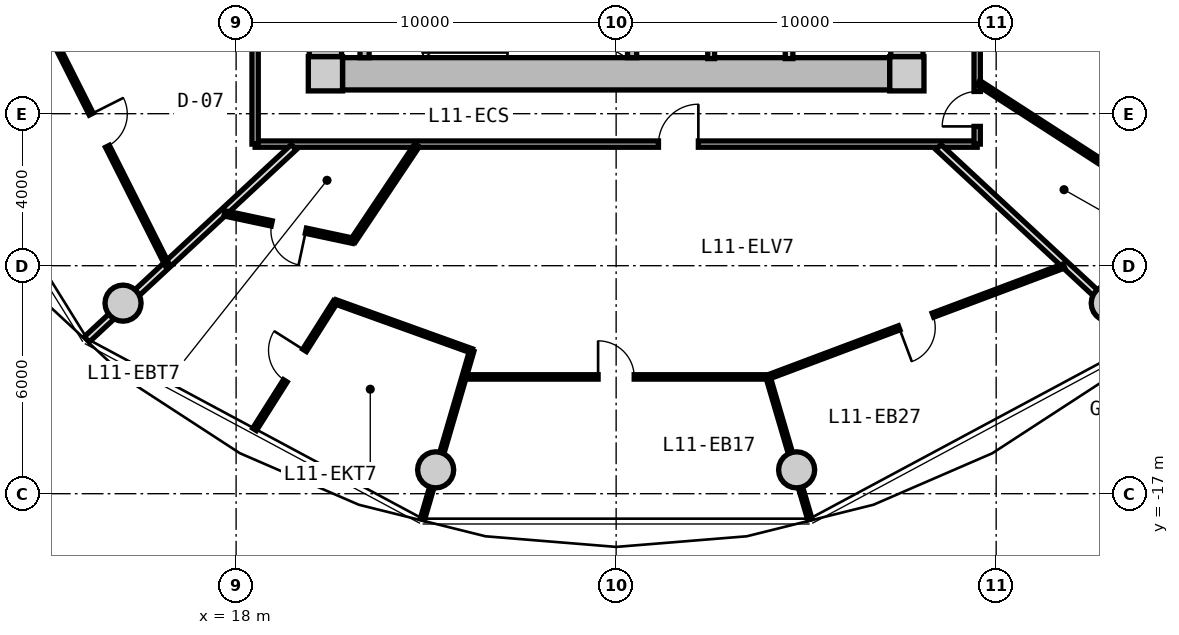
"""IFC4 building model, lengths in metres.
Left out: names, types, materials, properties, quantities, classifications, styles, units other than length and angle.
Written with IfcOpenShell. Run it as: python <this file> out.ifc"""

import sys

from ifc_helpers import new_model, si_unit, direction, frame, frame_2d, origin, origin_2d, place, context, subcontext, project, spatial, rectangle, circle, extrude, source, transform, mapped, element, fill, save


model = new_model("IFC4")
c1 = context("Model", 3, precision=1e-05, world=origin(), true_north=direction((0.0, 1.0)))
c2 = subcontext(c1, "Body", "Model", "MODEL_VIEW")
j1 = project(units=[si_unit("LENGTHUNIT", "METRE"), si_unit("PLANEANGLEUNIT", "RADIAN")], contexts=[c1])
p1 = place(None, origin())
s1 = spatial("IfcSite", under=j1, at=p1, CompositionType="ELEMENT")
p2 = place(p1, origin())
s2 = spatial("IfcBuilding", under=s1, at=p2, CompositionType="ELEMENT")
p3 = place(p2, frame((0.0, 0.0, 39.9)))
s3 = spatial("IfcBuildingStorey", under=s2, at=p3, CompositionType="ELEMENT", Elevation=39.9)
m1 = source(origin(), c2, "Body", "SweptSolid", [
    extrude(rectangle(XDim=0.9, YDim=0.9, at=origin_2d()), origin(), (0.0, 0.0, 1.0), 3.05),
])
for number, where, z_axis, x_axis in (
    (1, (20.35, -5.95, 0.0), (0.0, 0.0, 1.0), (1.0, 0.0, 0.0)),
    (2, (35.65, -5.95, 0.0), (0.0, 0.0, 1.0), (1.0, 0.0, 0.0)),
):
    element("IfcColumn", number, at=place(p3, frame(where, z_axis=z_axis, x_axis=x_axis)), inside=s3, PredefinedType="COLUMN", context=c2, shape_type="MappedRepresentation", body=[
        mapped(m1, transform((0.0, 0.0, 0.0), x_axis=(1.0, 0.0, 0.0), y_axis=(0.0, 1.0, 0.0), z_axis=(0.0, 0.0, 1.0), scale=1.0)),
    ])
m2 = source(origin(), c2, "Body", "SweptSolid", [
    extrude(rectangle(XDim=14.4, YDim=0.85, at=frame_2d((7.2, 0.0))), origin(), (0.0, 0.0, 1.0), 2.79),
])
p4 = place(p3, frame((35.2, -5.95, 0.0), z_axis=(0.0, 0.0, 1.0), x_axis=(-1.0, 0.0, 0.0)))
e3 = element("IfcWall", 3, at=p4, inside=s3, PredefinedType="SHEAR", context=c2, shape_type="MappedRepresentation", body=[
    mapped(m2, transform((0.0, 0.0, 0.0), x_axis=(1.0, 0.0, 0.0), y_axis=(0.0, 1.0, 0.0), z_axis=(0.0, 0.0, 1.0), scale=1.0)),
])
m3 = source(origin(), c2, "Body", "SweptSolid", [
    extrude(rectangle(XDim=11.0, YDim=0.85, at=frame_2d((5.5, 0.0))), origin(), (0.0, 0.0, 1.0), 2.79),
])
p5 = place(p3, frame((20.35, -5.5, 0.0), z_axis=(0.0, 0.0, 1.0), x_axis=(0.0, 1.0, 0.0)))
e4 = element("IfcWall", 4, at=p5, inside=s3, PredefinedType="SHEAR", context=c2, shape_type="MappedRepresentation", body=[
    mapped(m3, transform((0.0, 0.0, 0.0), x_axis=(1.0, 0.0, 0.0), y_axis=(0.0, 1.0, 0.0), z_axis=(0.0, 0.0, 1.0), scale=1.0)),
])
p6 = place(p5, frame((3.8, 0.0, 0.0)))
e5 = element("IfcOpeningElement", 5, at=p6, cuts=e4, PredefinedType="OPENING", context=c2, shape_type="SweptSolid", body=[
    extrude(rectangle(XDim=1.2, YDim=2.15, at=frame_2d((0.6, 1.075))), frame((0.0, 0.435, 0.0), z_axis=(0.0, -1.0, 0.0), x_axis=(1.0, 0.0, 0.0)), (0.0, 0.0, 1.0), 0.87),
])
p7 = place(p3, frame((35.65, 5.5, 0.0), z_axis=(0.0, 0.0, 1.0), x_axis=(0.0, -1.0, 0.0)))
e6 = element("IfcWall", 6, at=p7, inside=s3, PredefinedType="SHEAR", context=c2, shape_type="MappedRepresentation", body=[
    mapped(m3, transform((0.0, 0.0, 0.0), x_axis=(1.0, 0.0, 0.0), y_axis=(0.0, 1.0, 0.0), z_axis=(0.0, 0.0, 1.0), scale=1.0)),
])
p8 = place(p7, frame((5.65, 0.0, 0.0)))
e7 = element("IfcOpeningElement", 7, at=p8, cuts=e6, PredefinedType="OPENING", context=c2, shape_type="SweptSolid", body=[
    extrude(rectangle(XDim=1.2, YDim=2.15, at=frame_2d((0.6, 1.075))), frame((0.0, 0.435, 0.0), z_axis=(0.0, -1.0, 0.0), x_axis=(1.0, 0.0, 0.0)), (0.0, 0.0, 1.0), 0.87),
])
p9 = place(p7, frame((9.3, 0.0, 0.0)))
e8 = element("IfcOpeningElement", 8, at=p9, cuts=e6, PredefinedType="OPENING", context=c2, shape_type="SweptSolid", body=[
    extrude(rectangle(XDim=1.0, YDim=2.1, at=frame_2d((0.5, 1.05))), frame((0.0, 0.435, 0.0), z_axis=(0.0, -1.0, 0.0), x_axis=(1.0, 0.0, 0.0)), (0.0, 0.0, 1.0), 0.87),
])
m4 = source(origin(), c2, "Body", "SweptSolid", [
    extrude(circle(Radius=0.475, at=origin_2d()), origin(), (0.0, 0.0, 1.0), 3.05),
])
for number, where, z_axis, x_axis in (
    (9, (15.025, -11.985, 0.0), (0.0, 0.0, 1.0), (1.0, 0.0, 0.0)),
    (10, (23.251, -16.373, 0.0), (0.0, 0.0, 1.0), (1.0, 0.0, 0.0)),
    (11, (32.749, -16.373, 0.0), (0.0, 0.0, 1.0), (1.0, 0.0, 0.0)),
    (12, (40.975, -11.985, 0.0), (0.0, 0.0, 1.0), (1.0, 0.0, 0.0)),
):
    element("IfcColumn", number, at=place(p3, frame(where, z_axis=z_axis, x_axis=x_axis)), inside=s3, PredefinedType="COLUMN", context=c2, shape_type="MappedRepresentation", body=[
        mapped(m4, transform((0.0, 0.0, 0.0), x_axis=(1.0, 0.0, 0.0), y_axis=(0.0, 1.0, 0.0), z_axis=(0.0, 0.0, 1.0), scale=1.0)),
    ])
m5 = source(origin(), c2, "Body", "SweptSolid", [
    extrude(rectangle(XDim=3.075, YDim=0.24, at=frame_2d((1.538, 0.0))), origin(), (0.0, 0.0, 1.0), 2.79),
])
for number, where, z_axis, x_axis in (
    (13, (21.38, -5.525, 0.0), (0.0, 0.0, 1.0), (0.0, 1.0, 0.0)),
    (14, (28.42, -5.525, 0.0), (0.0, 0.0, 1.0), (0.0, 1.0, 0.0)),
):
    element("IfcWall", number, at=place(p3, frame(where, z_axis=z_axis, x_axis=x_axis)), inside=s3, PredefinedType="PARTITIONING", context=c2, shape_type="MappedRepresentation", body=[
        mapped(m5, transform((0.0, 0.0, 0.0), x_axis=(1.0, 0.0, 0.0), y_axis=(0.0, 1.0, 0.0), z_axis=(0.0, 0.0, 1.0), scale=1.0)),
    ])
m6 = source(origin(), c2, "Body", "SweptSolid", [
    extrude(rectangle(XDim=3.8, YDim=0.2, at=frame_2d((1.9, 0.0))), origin(), (0.0, 0.0, 1.0), 2.775),
])
p10 = place(p3, frame((32.55, -5.55, 0.0), z_axis=(0.0, 0.0, 1.0), x_axis=(0.0, 1.0, 0.0)))
e15 = element("IfcWall", 15, at=p10, inside=s3, PredefinedType="PARTITIONING", context=c2, shape_type="MappedRepresentation", body=[
    mapped(m6, transform((0.0, 0.0, 0.0), x_axis=(1.0, 0.0, 0.0), y_axis=(0.0, 1.0, 0.0), z_axis=(0.0, 0.0, 1.0), scale=1.0)),
])
m7 = source(origin(), c2, "Body", "SweptSolid", [
    extrude(rectangle(XDim=3.22, YDim=0.18, at=frame_2d((1.61, 0.0))), origin(), (0.0, 0.0, 1.0), 2.775),
])
p11 = place(p3, frame((30.5, -5.55, 0.0), z_axis=(0.0, 0.0, 1.0), x_axis=(0.0, 1.0, 0.0)))
e16 = element("IfcWall", 16, at=p11, inside=s3, PredefinedType="PARTITIONING", context=c2, shape_type="MappedRepresentation", body=[
    mapped(m7, transform((0.0, 0.0, 0.0), x_axis=(1.0, 0.0, 0.0), y_axis=(0.0, 1.0, 0.0), z_axis=(0.0, 0.0, 1.0), scale=1.0)),
])
m8 = source(origin(), c2, "Body", "SweptSolid", [
    extrude(rectangle(XDim=19.0, YDim=0.165, at=frame_2d((9.5, 0.0))), origin(), (0.0, 0.0, 1.0), 2.775),
])
p12 = place(p3, frame((37.5, -7.8, 0.0), z_axis=(0.0, 0.0, 1.0), x_axis=(-1.0, 0.0, 0.0)))
e17 = element("IfcWall", 17, at=p12, inside=s3, PredefinedType="PARTITIONING", context=c2, shape_type="MappedRepresentation", body=[
    mapped(m8, transform((0.0, 0.0, 0.0), x_axis=(1.0, 0.0, 0.0), y_axis=(0.0, 1.0, 0.0), z_axis=(0.0, 0.0, 1.0), scale=1.0)),
])
p13 = place(p12, frame((7.336, 0.0, 0.0)))
e18 = element("IfcOpeningElement", 18, at=p13, cuts=e17, PredefinedType="OPENING", context=c2, shape_type="SweptSolid", body=[
    extrude(rectangle(XDim=1.05, YDim=2.15, at=frame_2d((0.525, 1.075))), frame((0.0, 0.093, 0.0), z_axis=(0.0, -1.0, 0.0), x_axis=(1.0, 0.0, 0.0)), (0.0, 0.0, 1.0), 0.185),
])
m9 = source(origin(), c2, "Body", "SweptSolid", [
    extrude(rectangle(XDim=15.6, YDim=0.165, at=frame_2d((7.8, 0.0))), origin(), (0.0, 0.0, 1.0), 2.775),
])
p14 = place(p3, frame((18.5, -7.8, 0.0), z_axis=(0.0, 0.0, 1.0), x_axis=(0.0, 1.0, 0.0)))
e19 = element("IfcWall", 19, at=p14, inside=s3, PredefinedType="PARTITIONING", context=c2, shape_type="MappedRepresentation", body=[
    mapped(m9, transform((0.0, 0.0, 0.0), x_axis=(1.0, 0.0, 0.0), y_axis=(0.0, 1.0, 0.0), z_axis=(0.0, 0.0, 1.0), scale=1.0)),
])
p15 = place(p14, frame((7.275, 0.0, 0.0)))
e20 = element("IfcOpeningElement", 20, at=p15, cuts=e19, PredefinedType="OPENING", context=c2, shape_type="SweptSolid", body=[
    extrude(rectangle(XDim=1.05, YDim=2.15, at=frame_2d((0.525, 1.075))), frame((0.0, 0.093, 0.0), z_axis=(0.0, -1.0, 0.0), x_axis=(1.0, 0.0, 0.0)), (0.0, 0.0, 1.0), 0.185),
])
p16 = place(p3, frame((37.5, 7.8, 0.0), z_axis=(0.0, 0.0, 1.0), x_axis=(0.0, -1.0, 0.0)))
e21 = element("IfcWall", 21, at=p16, inside=s3, PredefinedType="PARTITIONING", context=c2, shape_type="MappedRepresentation", body=[
    mapped(m9, transform((0.0, 0.0, 0.0), x_axis=(1.0, 0.0, 0.0), y_axis=(0.0, 1.0, 0.0), z_axis=(0.0, 0.0, 1.0), scale=1.0)),
])
p17 = place(p16, frame((14.215, 0.0, 0.0)))
e22 = element("IfcOpeningElement", 22, at=p17, cuts=e21, PredefinedType="OPENING", context=c2, shape_type="SweptSolid", body=[
    extrude(rectangle(XDim=0.92, YDim=2.1, at=frame_2d((0.46, 1.05))), frame((0.0, 0.093, 0.0), z_axis=(0.0, -1.0, 0.0), x_axis=(1.0, 0.0, 0.0)), (0.0, 0.0, 1.0), 0.185),
])
p18 = place(p16, frame((11.609, 0.0, 0.0)))
e23 = element("IfcOpeningElement", 23, at=p18, cuts=e21, PredefinedType="OPENING", context=c2, shape_type="SweptSolid", body=[
    extrude(rectangle(XDim=0.92, YDim=2.1, at=frame_2d((0.46, 1.05))), frame((0.0, 0.093, 0.0), z_axis=(0.0, -1.0, 0.0), x_axis=(1.0, 0.0, 0.0)), (0.0, 0.0, 1.0), 0.185),
])
p19 = place(p16, frame((7.175, 0.0, 0.0)))
e24 = element("IfcOpeningElement", 24, at=p19, cuts=e21, PredefinedType="OPENING", context=c2, shape_type="SweptSolid", body=[
    extrude(rectangle(XDim=1.25, YDim=2.2, at=frame_2d((0.625, 1.1))), frame((0.0, 0.093, 0.0), z_axis=(0.0, -1.0, 0.0), x_axis=(1.0, 0.0, 0.0)), (0.0, 0.0, 1.0), 0.185),
])
m10 = source(origin(), c2, "Body", "SweptSolid", [
    extrude(rectangle(XDim=7.435, YDim=0.19, at=frame_2d((3.717, 0.0))), origin(), (0.0, 0.0, 1.0), 2.225),
])
p20 = place(p3, frame((19.517, -7.88, 0.0), z_axis=(0.0, 0.0, 1.0), x_axis=(-0.732651956848, -0.680603489652, 0.0)))
e25 = element("IfcWall", 25, at=p20, inside=s3, PredefinedType="PARTITIONING", context=c2, shape_type="MappedRepresentation", body=[
    mapped(m10, transform((0.0, 0.0, 0.0), x_axis=(1.0, 0.0, 0.0), y_axis=(0.0, 1.0, 0.0), z_axis=(0.0, 0.0, 1.0), scale=1.0)),
])
m11 = source(origin(), c2, "Body", "SweptSolid", [
    extrude(rectangle(XDim=8.018, YDim=0.115, at=frame_2d((4.009, 0.0))), origin(), (0.0, 0.0, 1.0), 2.775),
])
p21 = place(p3, frame((12.596, -3.854, 0.0), z_axis=(0.0, 0.0, 1.0), x_axis=(0.450134355233, -0.89296084026, 0.0)))
e26 = element("IfcWall", 26, at=p21, inside=s3, PredefinedType="PARTITIONING", context=c2, shape_type="MappedRepresentation", body=[
    mapped(m11, transform((0.0, 0.0, 0.0), x_axis=(1.0, 0.0, 0.0), y_axis=(0.0, 1.0, 0.0), z_axis=(0.0, 0.0, 1.0), scale=1.0)),
])
p22 = place(p21, frame((3.534, 0.0, 0.0)))
e27 = element("IfcOpeningElement", 27, at=p22, cuts=e26, PredefinedType="OPENING", context=c2, shape_type="SweptSolid", body=[
    extrude(rectangle(XDim=0.95, YDim=2.1, at=frame_2d((0.475, 1.05))), frame((0.0, 0.067, 0.0), z_axis=(0.0, -1.0, 0.0), x_axis=(1.0, 0.0, 0.0)), (0.0, 0.0, 1.0), 0.135),
])
p23 = place(p3, frame((36.483, -7.88, 0.0), z_axis=(0.0, 0.0, 1.0), x_axis=(0.732651956848, -0.680603489652, 0.0)))
e28 = element("IfcWall", 28, at=p23, inside=s3, PredefinedType="PARTITIONING", context=c2, shape_type="MappedRepresentation", body=[
    mapped(m10, transform((0.0, 0.0, 0.0), x_axis=(1.0, 0.0, 0.0), y_axis=(0.0, 1.0, 0.0), z_axis=(0.0, 0.0, 1.0), scale=1.0)),
])
m12 = source(origin(), c2, "Body", "SweptSolid", [
    extrude(rectangle(XDim=7.993, YDim=0.115, at=frame_2d((3.996, 0.0))), origin(), (0.0, 0.0, 1.0), 2.775),
])
p24 = place(p3, frame((24.004, -13.927, 0.0), z_axis=(0.0, 0.0, 1.0), x_axis=(1.0, 0.0, 0.0)))
e29 = element("IfcWall", 29, at=p24, inside=s3, PredefinedType="PARTITIONING", context=c2, shape_type="MappedRepresentation", body=[
    mapped(m12, transform((0.0, 0.0, 0.0), x_axis=(1.0, 0.0, 0.0), y_axis=(0.0, 1.0, 0.0), z_axis=(0.0, 0.0, 1.0), scale=1.0)),
])
p25 = place(p24, frame((3.521, 0.0, 0.0)))
e30 = element("IfcOpeningElement", 30, at=p25, cuts=e29, PredefinedType="OPENING", context=c2, shape_type="SweptSolid", body=[
    extrude(rectangle(XDim=0.95, YDim=2.1, at=frame_2d((0.475, 1.05))), frame((0.0, 0.067, 0.0), z_axis=(0.0, -1.0, 0.0), x_axis=(1.0, 0.0, 0.0)), (0.0, 0.0, 1.0), 0.135),
])
m13 = source(origin(), c2, "Body", "SweptSolid", [
    extrude(rectangle(XDim=4.625, YDim=0.115, at=frame_2d((2.312, 0.0))), origin(), (0.0, 0.0, 1.0), 2.225),
])
p26 = place(p3, frame((24.201, -13.239, 0.0), z_axis=(0.0, 0.0, 1.0), x_axis=(-0.2810742844, -0.959686014616, 0.0)))
e31 = element("IfcWall", 31, at=p26, inside=s3, PredefinedType="PARTITIONING", context=c2, shape_type="MappedRepresentation", body=[
    mapped(m13, transform((0.0, 0.0, 0.0), x_axis=(1.0, 0.0, 0.0), y_axis=(0.0, 1.0, 0.0), z_axis=(0.0, 0.0, 1.0), scale=1.0)),
])
m14 = source(origin(), c2, "Body", "SweptSolid", [
    extrude(rectangle(XDim=8.32, YDim=0.115, at=frame_2d((4.16, 0.0))), origin(), (0.0, 0.0, 1.0), 2.775),
])
p27 = place(p3, frame((31.997, -13.93, 0.0), z_axis=(0.0, 0.0, 1.0), x_axis=(0.936180763098, 0.351518959382, 0.0)))
e32 = element("IfcWall", 32, at=p27, inside=s3, PredefinedType="PARTITIONING", context=c2, shape_type="MappedRepresentation", body=[
    mapped(m14, transform((0.0, 0.0, 0.0), x_axis=(1.0, 0.0, 0.0), y_axis=(0.0, 1.0, 0.0), z_axis=(0.0, 0.0, 1.0), scale=1.0)),
])
p28 = place(p27, frame((3.685, 0.0, 0.0)))
e33 = element("IfcOpeningElement", 33, at=p28, cuts=e32, PredefinedType="OPENING", context=c2, shape_type="SweptSolid", body=[
    extrude(rectangle(XDim=0.95, YDim=2.1, at=frame_2d((0.475, 1.05))), frame((0.0, 0.067, 0.0), z_axis=(0.0, -1.0, 0.0), x_axis=(1.0, 0.0, 0.0)), (0.0, 0.0, 1.0), 0.135),
])
m15 = source(origin(), c2, "Body", "SweptSolid", [
    extrude(rectangle(XDim=3.905, YDim=0.115, at=frame_2d((1.952, 0.0))), origin(), (0.0, 0.0, 1.0), 2.225),
])
p29 = place(p3, frame((31.997, -13.93, 0.0), z_axis=(0.0, 0.0, 1.0), x_axis=(0.282037692958, -0.959403324859, 0.0)))
e34 = element("IfcWall", 34, at=p29, inside=s3, PredefinedType="PARTITIONING", context=c2, shape_type="MappedRepresentation", body=[
    mapped(m15, transform((0.0, 0.0, 0.0), x_axis=(1.0, 0.0, 0.0), y_axis=(0.0, 1.0, 0.0), z_axis=(0.0, 0.0, 1.0), scale=1.0)),
])
m16 = source(origin(), c2, "Body", "SweptSolid", [
    extrude(rectangle(XDim=3.025, YDim=0.14, at=frame_2d((1.513, 0.0))), origin(), (0.0, 0.0, 1.0), 2.775),
])
p30 = place(p3, frame((22.76, -7.83, 0.0), z_axis=(0.0, 0.0, 1.0), x_axis=(-0.556189165904, -0.831055721195, 0.0)))
e35 = element("IfcWall", 35, at=p30, inside=s3, PredefinedType="PARTITIONING", context=c2, shape_type="MappedRepresentation", body=[
    mapped(m16, transform((0.0, 0.0, 0.0), x_axis=(1.0, 0.0, 0.0), y_axis=(0.0, 1.0, 0.0), z_axis=(0.0, 0.0, 1.0), scale=1.0)),
])
m17 = source(origin(), c2, "Body", "SweptSolid", [
    extrude(rectangle(XDim=3.459, YDim=0.14, at=frame_2d((1.729, 0.0))), origin(), (0.0, 0.0, 1.0), 2.775),
])
p31 = place(p3, frame((21.078, -10.344, 0.0), z_axis=(0.0, 0.0, 1.0), x_axis=(-0.978006468578, 0.208574560815, 0.0)))
e36 = element("IfcWall", 36, at=p31, inside=s3, PredefinedType="PARTITIONING", context=c2, shape_type="MappedRepresentation", body=[
    mapped(m17, transform((0.0, 0.0, 0.0), x_axis=(1.0, 0.0, 0.0), y_axis=(0.0, 1.0, 0.0), z_axis=(0.0, 0.0, 1.0), scale=1.0)),
])
p32 = place(p31, frame((1.27, 0.0, 0.0)))
e37 = element("IfcOpeningElement", 37, at=p32, cuts=e36, PredefinedType="OPENING", context=c2, shape_type="SweptSolid", body=[
    extrude(rectangle(XDim=0.92, YDim=2.1, at=frame_2d((0.46, 1.05))), frame((0.0, 0.08, 0.0), z_axis=(0.0, -1.0, 0.0), x_axis=(1.0, 0.0, 0.0)), (0.0, 0.0, 1.0), 0.16),
])
m18 = source(origin(), c2, "Body", "SweptSolid", [
    extrude(rectangle(XDim=3.974, YDim=0.115, at=frame_2d((1.987, 0.0))), origin(), (0.0, 0.0, 1.0), 2.775),
])
p33 = place(p3, frame((20.611, -11.95, 0.0), z_axis=(0.0, 0.0, 1.0), x_axis=(-0.534810918023, -0.844971764003, 0.0)))
e38 = element("IfcWall", 38, at=p33, inside=s3, PredefinedType="PARTITIONING", context=c2, shape_type="MappedRepresentation", body=[
    mapped(m18, transform((0.0, 0.0, 0.0), x_axis=(1.0, 0.0, 0.0), y_axis=(0.0, 1.0, 0.0), z_axis=(0.0, 0.0, 1.0), scale=1.0)),
])
p34 = place(p33, frame((1.512, 0.0, 0.0)))
e39 = element("IfcOpeningElement", 39, at=p34, cuts=e38, PredefinedType="OPENING", context=c2, shape_type="SweptSolid", body=[
    extrude(rectangle(XDim=0.95, YDim=2.1, at=frame_2d((0.475, 1.05))), frame((0.0, 0.067, 0.0), z_axis=(0.0, -1.0, 0.0), x_axis=(1.0, 0.0, 0.0)), (0.0, 0.0, 1.0), 0.135),
])
m19 = source(origin(), c2, "Body", "SweptSolid", [
    extrude(rectangle(XDim=3.814, YDim=0.115, at=frame_2d((1.907, 0.0))), origin(), (0.0, 0.0, 1.0), 2.775),
])
p35 = place(p3, frame((20.611, -11.95, 0.0), z_axis=(0.0, 0.0, 1.0), x_axis=(0.940935542004, -0.338585743637, 0.0)))
e40 = element("IfcWall", 40, at=p35, inside=s3, PredefinedType="PARTITIONING", context=c2, shape_type="MappedRepresentation", body=[
    mapped(m19, transform((0.0, 0.0, 0.0), x_axis=(1.0, 0.0, 0.0), y_axis=(0.0, 1.0, 0.0), z_axis=(0.0, 0.0, 1.0), scale=1.0)),
])
m20 = source(origin(), c2, "Body", "SweptSolid", [
    extrude(rectangle(XDim=7.304, YDim=0.14, at=frame_2d((3.652, 0.0))), origin(), (0.0, 0.0, 1.0), 2.775),
])
p36 = place(p3, frame((37.53, -6.185, 0.0), z_axis=(0.0, 0.0, 1.0), x_axis=(0.83973870965, -0.54299069929, 0.0)))
e41 = element("IfcWall", 41, at=p36, inside=s3, PredefinedType="PARTITIONING", context=c2, shape_type="MappedRepresentation", body=[
    mapped(m20, transform((0.0, 0.0, 0.0), x_axis=(1.0, 0.0, 0.0), y_axis=(0.0, 1.0, 0.0), z_axis=(0.0, 0.0, 1.0), scale=1.0)),
])
m21 = source(origin(), c2, "Body", "SweptSolid", [
    extrude(rectangle(XDim=0.95, YDim=2.1, at=frame_2d((0.475, 1.05))), frame((0.0, 0.025, 0.0), z_axis=(0.0, -1.0, 0.0), x_axis=(1.0, 0.0, 0.0)), (0.0, 0.0, 1.0), 0.05),
])
p37 = place(p22, origin())
e42 = element("IfcDoor", 42, at=p37, inside=s3, OperationType="SINGLE_SWING_LEFT", PredefinedType="DOOR", context=c2, shape_type="MappedRepresentation", body=[
    mapped(m21, transform((0.0, 0.0, 0.0), x_axis=(1.0, 0.0, 0.0), y_axis=(0.0, 1.0, 0.0), z_axis=(0.0, 0.0, 1.0), scale=1.0)),
])
fill(e27, e42)
m22 = source(origin(), c2, "Body", "SweptSolid", [
    extrude(rectangle(XDim=1.05, YDim=2.15, at=frame_2d((0.525, 1.075))), frame((0.0, 0.025, 0.0), z_axis=(0.0, -1.0, 0.0), x_axis=(1.0, 0.0, 0.0)), (0.0, 0.0, 1.0), 0.05),
])
p38 = place(p13, frame((1.05, 0.0, 0.0), z_axis=(0.0, 0.0, 1.0), x_axis=(-1.0, 0.0, 0.0)))
e43 = element("IfcDoor", 43, at=p38, inside=s3, OperationType="SINGLE_SWING_RIGHT", PredefinedType="DOOR", context=c2, shape_type="MappedRepresentation", body=[
    mapped(m22, transform((0.0, 0.0, 0.0), x_axis=(1.0, 0.0, 0.0), y_axis=(0.0, 1.0, 0.0), z_axis=(0.0, 0.0, 1.0), scale=1.0)),
])
fill(e18, e43)
m23 = source(origin(), c2, "Body", "SweptSolid", [
    extrude(rectangle(XDim=0.92, YDim=2.1, at=frame_2d((0.46, 1.05))), frame((0.0, 0.025, 0.0), z_axis=(0.0, -1.0, 0.0), x_axis=(1.0, 0.0, 0.0)), (0.0, 0.0, 1.0), 0.05),
])
p39 = place(p32, origin())
e44 = element("IfcDoor", 44, at=p39, inside=s3, OperationType="SINGLE_SWING_LEFT", PredefinedType="DOOR", context=c2, shape_type="MappedRepresentation", body=[
    mapped(m23, transform((0.0, 0.0, 0.0), x_axis=(1.0, 0.0, 0.0), y_axis=(0.0, 1.0, 0.0), z_axis=(0.0, 0.0, 1.0), scale=1.0)),
])
fill(e37, e44)
p40 = place(p34, frame((0.95, 0.0, 0.0), z_axis=(0.0, 0.0, 1.0), x_axis=(-1.0, 0.0, 0.0)))
e45 = element("IfcDoor", 45, at=p40, inside=s3, OperationType="SINGLE_SWING_RIGHT", PredefinedType="DOOR", context=c2, shape_type="MappedRepresentation", body=[
    mapped(m21, transform((0.0, 0.0, 0.0), x_axis=(1.0, 0.0, 0.0), y_axis=(0.0, 1.0, 0.0), z_axis=(0.0, 0.0, 1.0), scale=1.0)),
])
fill(e39, e45)
p41 = place(p25, origin())
e46 = element("IfcDoor", 46, at=p41, inside=s3, OperationType="SINGLE_SWING_LEFT", PredefinedType="DOOR", context=c2, shape_type="MappedRepresentation", body=[
    mapped(m21, transform((0.0, 0.0, 0.0), x_axis=(1.0, 0.0, 0.0), y_axis=(0.0, 1.0, 0.0), z_axis=(0.0, 0.0, 1.0), scale=1.0)),
])
fill(e30, e46)
p42 = place(p28, frame((0.95, 0.0, 0.0), z_axis=(0.0, 0.0, 1.0), x_axis=(-1.0, 0.0, 0.0)))
e47 = element("IfcDoor", 47, at=p42, inside=s3, OperationType="SINGLE_SWING_RIGHT", PredefinedType="DOOR", context=c2, shape_type="MappedRepresentation", body=[
    mapped(m21, transform((0.0, 0.0, 0.0), x_axis=(1.0, 0.0, 0.0), y_axis=(0.0, 1.0, 0.0), z_axis=(0.0, 0.0, 1.0), scale=1.0)),
])
fill(e33, e47)
p43 = place(p17, frame((0.92, 0.0, 0.0), z_axis=(0.0, 0.0, 1.0), x_axis=(-1.0, 0.0, 0.0)))
e48 = element("IfcDoor", 48, at=p43, inside=s3, OperationType="SINGLE_SWING_LEFT", PredefinedType="DOOR", context=c2, shape_type="MappedRepresentation", body=[
    mapped(m23, transform((0.0, 0.0, 0.0), x_axis=(1.0, 0.0, 0.0), y_axis=(0.0, 1.0, 0.0), z_axis=(0.0, 0.0, 1.0), scale=1.0)),
])
fill(e22, e48)
save(model, sys.argv[1])
